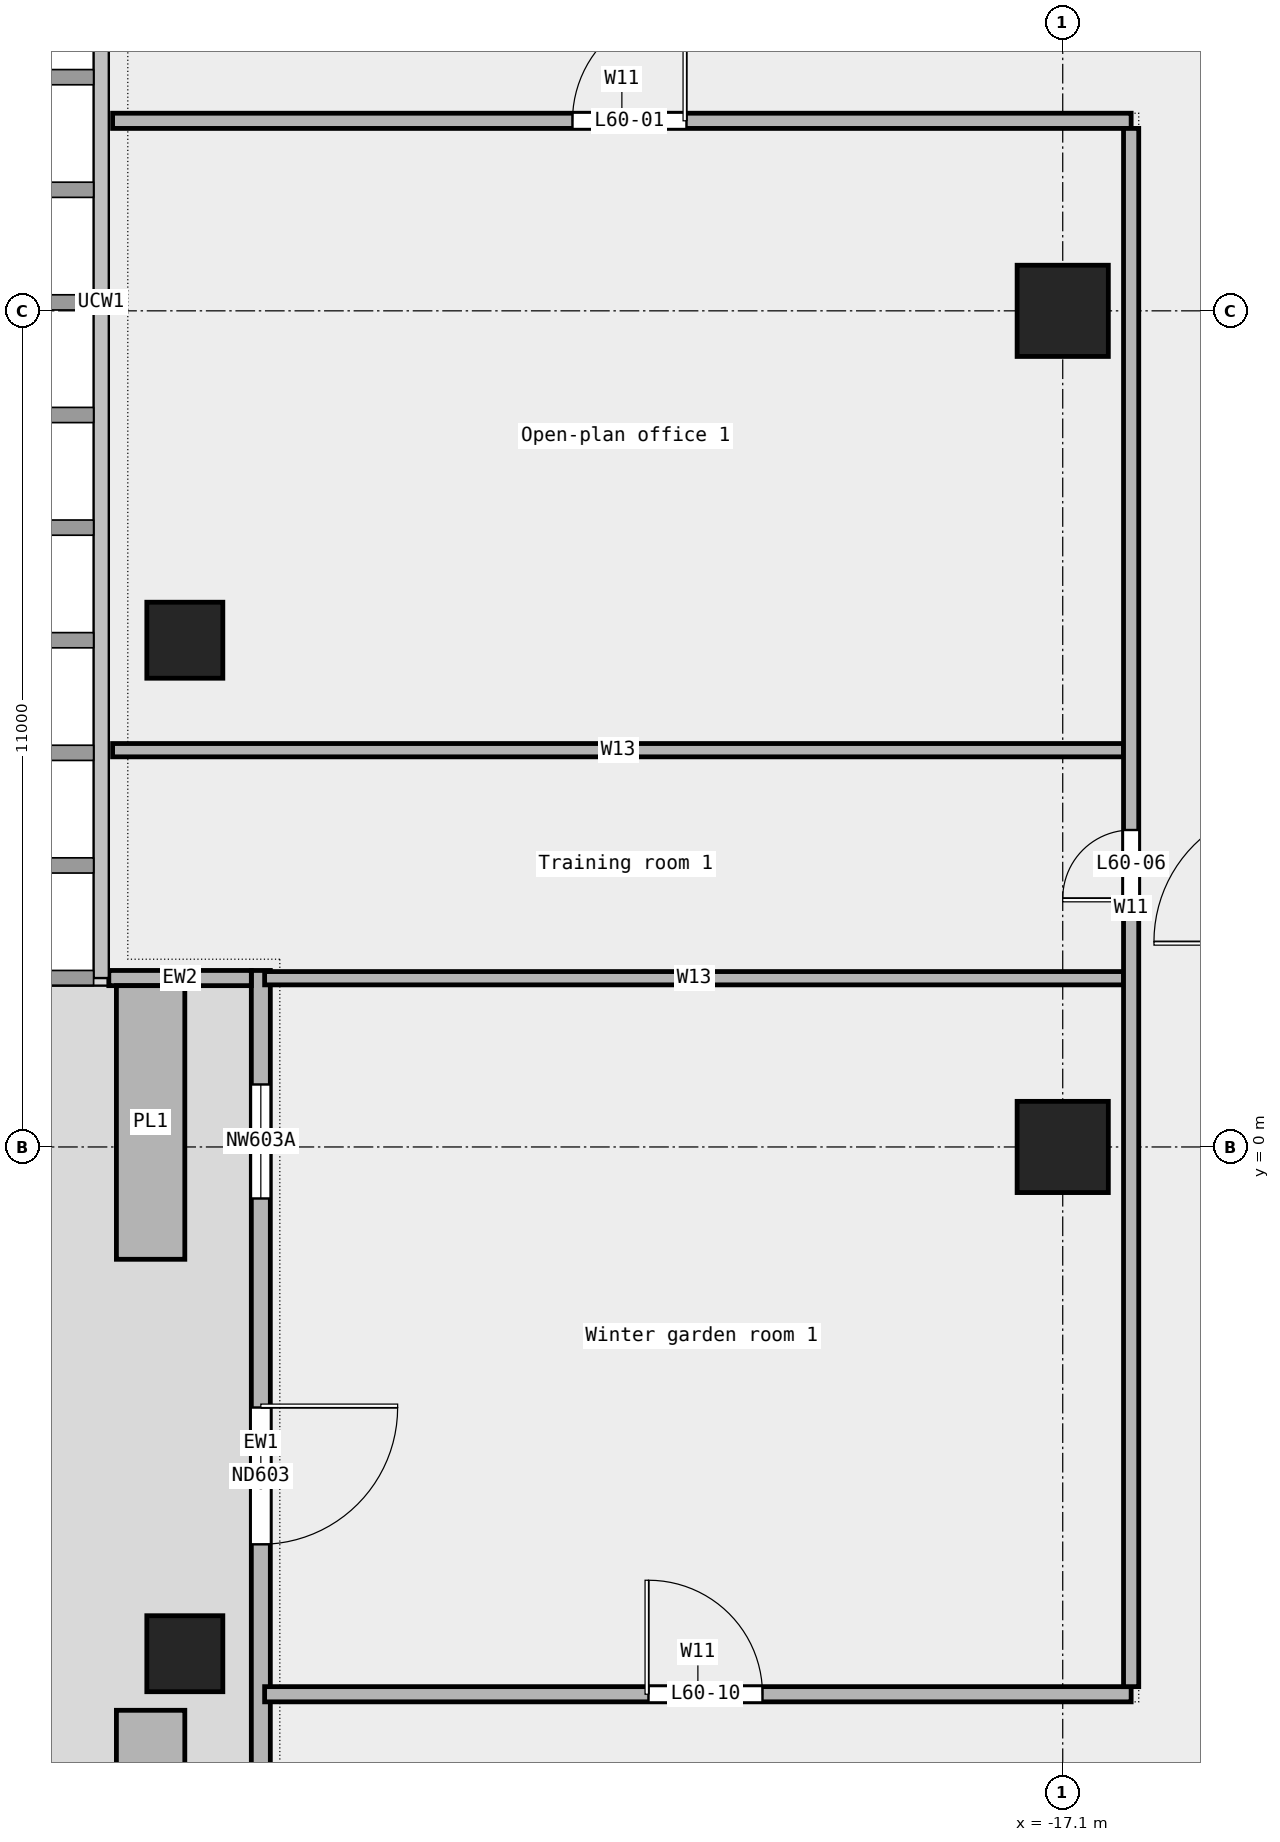
"""IFC4 building model, lengths in metres.
Left out: names, types, materials, properties, quantities, classifications, styles, units other than length and angle.
Written with IfcOpenShell. Run it as: python <this file> out.ifc"""

import sys

from ifc_helpers import new_model, si_unit, direction, frame, frame_2d, origin, origin_2d, place, context, subcontext, project, spatial, rectangle, extrude, element, fill, save


model = new_model("IFC4")
c1 = context("Model", 3, precision=1e-05, world=origin(), true_north=direction((0.0, 1.0)))
c2 = subcontext(c1, "Body", "Model", "MODEL_VIEW")
j1 = project(units=[si_unit("LENGTHUNIT", "METRE"), si_unit("PLANEANGLEUNIT", "RADIAN")], contexts=[c1])
p1 = place(None, origin())
s1 = spatial("IfcSite", under=j1, at=p1, CompositionType="ELEMENT")
p2 = place(p1, origin())
s2 = spatial("IfcBuilding", under=s1, at=p2, CompositionType="ELEMENT")
p3 = place(p2, frame((0.0, 0.0, 279.4)))
s3 = spatial("IfcBuildingStorey", under=s2, at=p3, CompositionType="ELEMENT", Elevation=279.4)
for number, where, z_axis, x_axis in (
    (1, (-28.65, 6.667, 0.0), (0.0, 0.0, 1.0), (1.0, 0.0, 0.0)),
    (2, (-28.65, -6.667, 0.0), (0.0, 0.0, 1.0), (1.0, 0.0, 0.0)),
):
    element("IfcColumn", number, at=place(p3, frame(where, z_axis=z_axis, x_axis=x_axis)), inside=s3, PredefinedType="COLUMN", context=c2, shape_type="SweptSolid", body=[
        extrude(rectangle(XDim=1.0, YDim=1.0, at=origin_2d()), origin(), (0.0, 0.0, 1.0), 3.6),
    ])
for number, where, z_axis, x_axis in (
    (3, (-17.1, 0.0, 0.0), (0.0, 0.0, 1.0), (1.0, 0.0, 0.0)),
    (4, (-17.1, 11.0, 0.0), (0.0, 0.0, 1.0), (1.0, 0.0, 0.0)),
):
    element("IfcColumn", number, at=place(p3, frame(where, z_axis=z_axis, x_axis=x_axis)), inside=s3, PredefinedType="COLUMN", context=c2, shape_type="SweptSolid", body=[
        extrude(rectangle(XDim=1.2, YDim=1.2, at=origin_2d()), origin(), (0.0, 0.0, 1.0), 3.6),
    ])
p4 = place(p3, frame((-27.65, 2.322, 0.0), z_axis=(0.0, 0.0, 1.0), x_axis=(0.0, -1.0, 0.0)))
e5 = element("IfcWall", 5, at=p4, inside=s3, PredefinedType="STANDARD", context=c2, shape_type="SweptSolid", body=[
    extrude(rectangle(XDim=13.533, YDim=0.25, at=frame_2d((6.767, 0.0))), origin(), (0.0, 0.0, 1.0), 3.6),
])
p5 = place(p4, frame((1.5, 0.0, 0.45)))
e6 = element("IfcOpeningElement", 6, at=p5, cuts=e5, PredefinedType="OPENING", context=c2, shape_type="SweptSolid", body=[
    extrude(rectangle(XDim=1.5, YDim=2.4, at=frame_2d((0.75, 1.2))), frame((0.0, 0.137, 0.0), z_axis=(0.0, -1.0, 0.0), x_axis=(1.0, 0.0, 0.0)), (0.0, 0.0, 1.0), 0.274),
])
p6 = place(p4, frame((5.75, 0.0, 0.0)))
e7 = element("IfcOpeningElement", 7, at=p6, cuts=e5, PredefinedType="OPENING", context=c2, shape_type="SweptSolid", body=[
    extrude(rectangle(XDim=1.8, YDim=2.4, at=frame_2d((0.9, 1.2))), frame((0.0, 0.137, 0.0), z_axis=(0.0, -1.0, 0.0), x_axis=(1.0, 0.0, 0.0)), (0.0, 0.0, 1.0), 0.274),
])
p7 = place(p4, frame((10.5, 0.0, 0.45)))
e8 = element("IfcOpeningElement", 8, at=p7, cuts=e5, PredefinedType="OPENING", context=c2, shape_type="SweptSolid", body=[
    extrude(rectangle(XDim=1.5, YDim=2.4, at=frame_2d((0.75, 1.2))), frame((0.0, 0.137, 0.0), z_axis=(0.0, -1.0, 0.0), x_axis=(1.0, 0.0, 0.0)), (0.0, 0.0, 1.0), 0.274),
])
p8 = place(p3, frame((-29.65, 2.222, 0.0), z_axis=(0.0, 0.0, 1.0), x_axis=(1.0, 0.0, 0.0)))
e9 = element("IfcWall", 9, at=p8, inside=s3, PredefinedType="STANDARD", context=c2, shape_type="SweptSolid", body=[
    extrude(rectangle(XDim=1.875, YDim=0.2, at=frame_2d((0.938, 0.0))), origin(), (0.0, 0.0, 1.0), 3.6),
])
for number, where, z_axis, x_axis in (
    (10, (-29.1, 2.122, 0.0), (0.0, 0.0, 1.0), (0.0, -1.0, 0.0)),
    (11, (-29.1, -7.411, 0.0), (0.0, 0.0, 1.0), (0.0, -1.0, 0.0)),
):
    element("IfcWall", number, at=place(p3, frame(where, z_axis=z_axis, x_axis=x_axis)), inside=s3, PredefinedType="STANDARD", context=c2, shape_type="SweptSolid", body=[
        extrude(rectangle(XDim=3.6, YDim=0.9, at=frame_2d((1.8, 0.0))), origin(), (0.0, 0.0, 1.0), 0.7),
    ])
p9 = place(p3, frame((-27.6, -7.2, 0.0), z_axis=(0.0, 0.0, 1.0), x_axis=(1.0, 0.0, 0.0)))
e12 = element("IfcWall", 12, at=p9, inside=s3, PredefinedType="PARTITIONING", context=c2, shape_type="SweptSolid", body=[
    extrude(rectangle(XDim=11.4, YDim=0.2, at=frame_2d((5.7, 0.0))), origin(), (0.0, 0.0, 1.0), 3.6),
])
p10 = place(p9, frame((5.05, 0.0, 0.0)))
e13 = element("IfcOpeningElement", 13, at=p10, cuts=e12, PredefinedType="OPENING", context=c2, shape_type="SweptSolid", body=[
    extrude(rectangle(XDim=1.5, YDim=2.1, at=frame_2d((0.75, 1.05))), frame((0.0, 0.112, 0.0), z_axis=(0.0, -1.0, 0.0), x_axis=(1.0, 0.0, 0.0)), (0.0, 0.0, 1.0), 0.224),
])
p11 = place(p3, frame((-27.6, 2.22, 0.0), z_axis=(0.0, 0.0, 1.0), x_axis=(1.0, 0.0, 0.0)))
e14 = element("IfcWall", 14, at=p11, inside=s3, PredefinedType="PARTITIONING", context=c2, shape_type="SweptSolid", body=[
    extrude(rectangle(XDim=11.3, YDim=0.175, at=frame_2d((5.65, 0.0))), origin(), (0.0, 0.0, 1.0), 3.6),
])
p12 = place(p3, frame((-29.6, 5.22, 0.0), z_axis=(0.0, 0.0, 1.0), x_axis=(1.0, 0.0, 0.0)))
e15 = element("IfcWall", 15, at=p12, inside=s3, PredefinedType="PARTITIONING", context=c2, shape_type="SweptSolid", body=[
    extrude(rectangle(XDim=13.3, YDim=0.175, at=frame_2d((6.65, 0.0))), origin(), (0.0, 0.0, 1.0), 3.6),
])
p13 = place(p3, frame((-29.6, 13.5, 0.0), z_axis=(0.0, 0.0, 1.0), x_axis=(1.0, 0.0, 0.0)))
e16 = element("IfcWall", 16, at=p13, inside=s3, PredefinedType="PARTITIONING", context=c2, shape_type="SweptSolid", body=[
    extrude(rectangle(XDim=13.4, YDim=0.2, at=frame_2d((6.7, 0.0))), origin(), (0.0, 0.0, 1.0), 3.6),
])
p14 = place(p13, frame((6.05, 0.0, 0.0)))
e17 = element("IfcOpeningElement", 17, at=p14, cuts=e16, PredefinedType="OPENING", context=c2, shape_type="SweptSolid", body=[
    extrude(rectangle(XDim=1.5, YDim=2.1, at=frame_2d((0.75, 1.05))), frame((0.0, 0.112, 0.0), z_axis=(0.0, -1.0, 0.0), x_axis=(1.0, 0.0, 0.0)), (0.0, 0.0, 1.0), 0.224),
])
p15 = place(p3, frame((-16.2, -7.1, 0.0), z_axis=(0.0, 0.0, 1.0), x_axis=(0.0, 1.0, 0.0)))
e18 = element("IfcWall", 18, at=p15, inside=s3, PredefinedType="PARTITIONING", context=c2, shape_type="SweptSolid", body=[
    extrude(rectangle(XDim=20.5, YDim=0.2, at=frame_2d((10.25, 0.0))), origin(), (0.0, 0.0, 1.0), 3.6),
])
p16 = place(p15, frame((10.37, 0.0, 0.0)))
e19 = element("IfcOpeningElement", 19, at=p16, cuts=e18, PredefinedType="OPENING", context=c2, shape_type="SweptSolid", body=[
    extrude(rectangle(XDim=0.9, YDim=2.1, at=frame_2d((0.45, 1.05))), frame((0.0, 0.112, 0.0), z_axis=(0.0, -1.0, 0.0), x_axis=(1.0, 0.0, 0.0)), (0.0, 0.0, 1.0), 0.224),
])
p17 = place(p5, origin())
e20 = element("IfcWindow", 20, at=p17, inside=s3, PartitioningType="SINGLE_PANEL", PredefinedType="WINDOW", context=c2, shape_type="SweptSolid", body=[
    extrude(rectangle(XDim=1.5, YDim=2.4, at=frame_2d((0.75, 1.2))), frame((0.0, 0.03, 0.0), z_axis=(0.0, -1.0, 0.0), x_axis=(1.0, 0.0, 0.0)), (0.0, 0.0, 1.0), 0.06),
])
fill(e6, e20)
p18 = place(p6, origin())
e21 = element("IfcDoor", 21, at=p18, inside=s3, OperationType="DOUBLE_DOOR_SINGLE_SWING", PredefinedType="DOOR", context=c2, shape_type="SweptSolid", body=[
    extrude(rectangle(XDim=1.8, YDim=2.4, at=frame_2d((0.9, 1.2))), frame((0.0, 0.025, 0.0), z_axis=(0.0, -1.0, 0.0), x_axis=(1.0, 0.0, 0.0)), (0.0, 0.0, 1.0), 0.05),
])
fill(e7, e21)
p19 = place(p14, origin())
e22 = element("IfcDoor", 22, at=p19, inside=s3, OperationType="DOUBLE_DOOR_SINGLE_SWING", PredefinedType="DOOR", context=c2, shape_type="SweptSolid", body=[
    extrude(rectangle(XDim=1.5, YDim=2.1, at=frame_2d((0.75, 1.05))), frame((0.0, 0.025, 0.0), z_axis=(0.0, -1.0, 0.0), x_axis=(1.0, 0.0, 0.0)), (0.0, 0.0, 1.0), 0.05),
])
fill(e17, e22)
p20 = place(p16, origin())
e23 = element("IfcDoor", 23, at=p20, inside=s3, OperationType="SINGLE_SWING_LEFT", PredefinedType="DOOR", context=c2, shape_type="SweptSolid", body=[
    extrude(rectangle(XDim=0.9, YDim=2.1, at=frame_2d((0.45, 1.05))), frame((0.0, 0.025, 0.0), z_axis=(0.0, -1.0, 0.0), x_axis=(1.0, 0.0, 0.0)), (0.0, 0.0, 1.0), 0.05),
])
fill(e19, e23)
p21 = place(p10, origin())
e24 = element("IfcDoor", 24, at=p21, inside=s3, OperationType="DOUBLE_DOOR_SINGLE_SWING", PredefinedType="DOOR", context=c2, shape_type="SweptSolid", body=[
    extrude(rectangle(XDim=1.5, YDim=2.1, at=frame_2d((0.75, 1.05))), frame((0.0, 0.025, 0.0), z_axis=(0.0, -1.0, 0.0), x_axis=(1.0, 0.0, 0.0)), (0.0, 0.0, 1.0), 0.05),
])
fill(e13, e24)
save(model, sys.argv[1])
